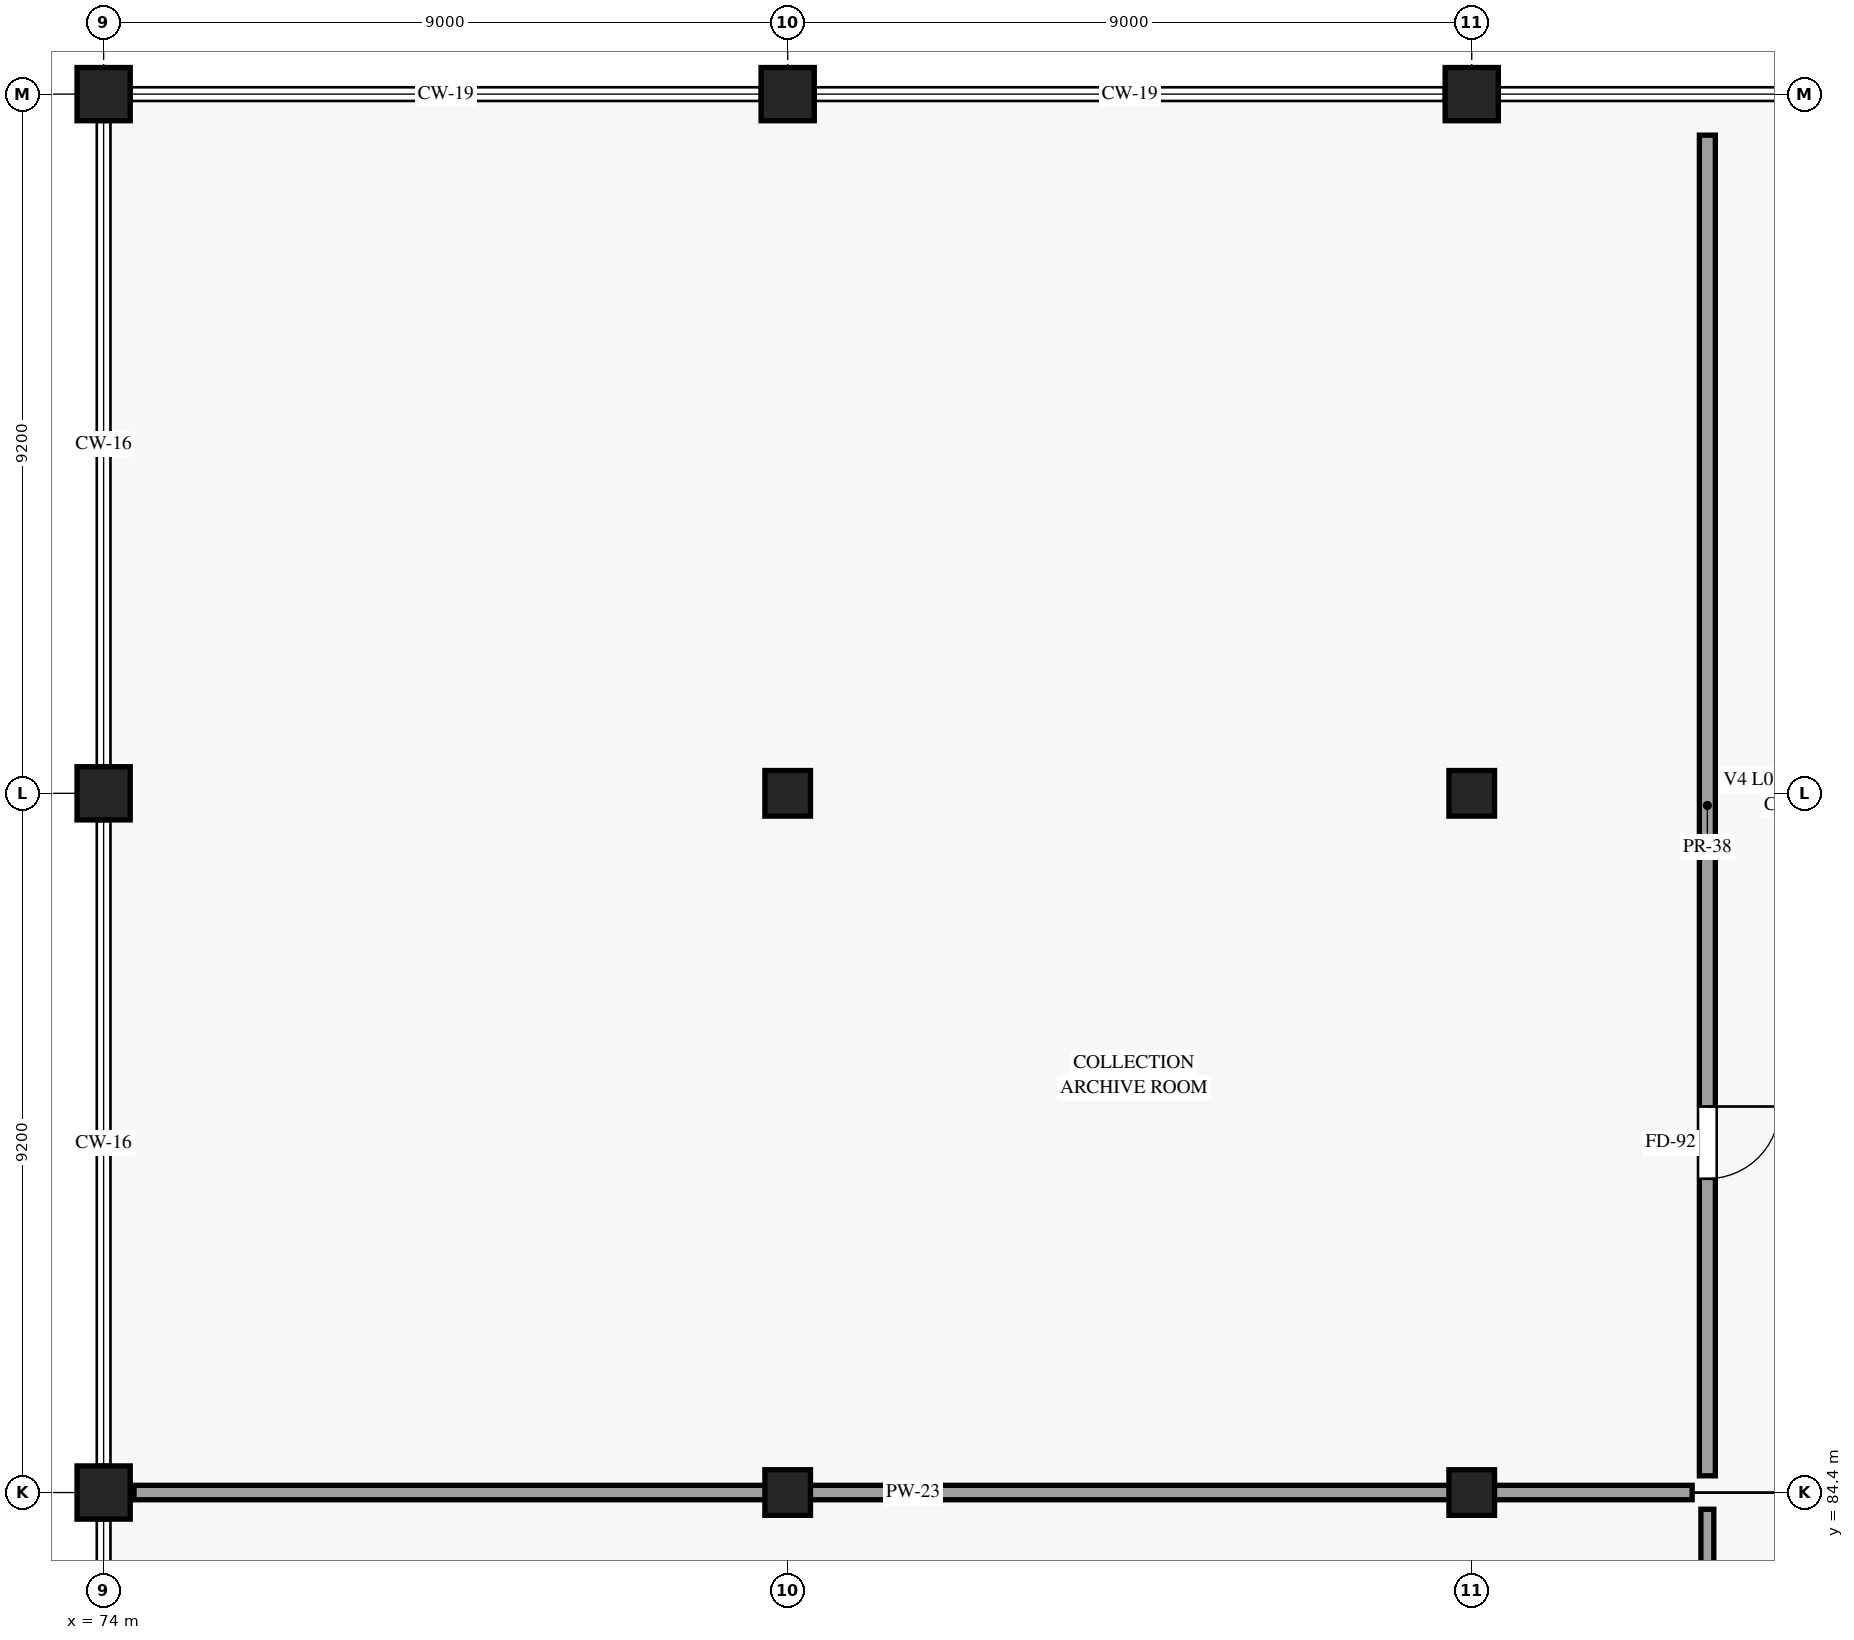
"""IFC4 building model, lengths in metres.
Left out: names, types, materials, properties, quantities, classifications, styles, units other than length and angle.
Written with IfcOpenShell. Run it as: python <this file> out.ifc"""

import sys

from ifc_helpers import new_model, si_unit, direction, frame, frame_2d, origin, origin_2d, place, context, subcontext, project, spatial, rectangle, extrude, element, fill, save


model = new_model("IFC4")
c1 = context("Model", 3, precision=1e-05, world=origin(), true_north=direction((0.0, 1.0)))
c2 = subcontext(c1, "Body", "Model", "MODEL_VIEW")
j1 = project(units=[si_unit("LENGTHUNIT", "METRE"), si_unit("PLANEANGLEUNIT", "RADIAN")], contexts=[c1])
p1 = place(None, origin())
s1 = spatial("IfcSite", under=j1, at=p1, CompositionType="ELEMENT")
p2 = place(p1, origin())
s2 = spatial("IfcBuilding", under=s1, at=p2, CompositionType="ELEMENT")
p3 = place(p2, frame((0.0, 0.0, 5.4)))
s3 = spatial("IfcBuildingStorey", under=s2, at=p3, CompositionType="ELEMENT", Elevation=5.4)
for number, where, z_axis, x_axis in (
    (1, (74.0, 84.4, 0.0), (0.0, 0.0, 1.0), (1.0, 0.0, 0.0)),
    (2, (74.0, 93.6, 0.0), (0.0, 0.0, 1.0), (1.0, 0.0, 0.0)),
    (3, (74.0, 102.8, 0.0), (0.0, 0.0, 1.0), (1.0, 0.0, 0.0)),
):
    element("IfcColumn", number, at=place(p3, frame(where, z_axis=z_axis, x_axis=x_axis)), inside=s3, PredefinedType="COLUMN", context=c2, shape_type="SweptSolid", body=[
        extrude(rectangle(XDim=0.7, YDim=0.7, at=origin_2d()), origin(), (0.0, 0.0, 1.0), 4.8),
    ])
for number, where, z_axis, x_axis in (
    (4, (83.0, 84.4, 0.0), (0.0, 0.0, 1.0), (1.0, 0.0, 0.0)),
    (5, (83.0, 93.6, 0.0), (0.0, 0.0, 1.0), (1.0, 0.0, 0.0)),
):
    element("IfcColumn", number, at=place(p3, frame(where, z_axis=z_axis, x_axis=x_axis)), inside=s3, PredefinedType="COLUMN", context=c2, shape_type="SweptSolid", body=[
        extrude(rectangle(XDim=0.6, YDim=0.6, at=origin_2d()), origin(), (0.0, 0.0, 1.0), 4.8),
    ])
p4 = place(p3, frame((83.0, 102.8, 0.0), z_axis=(0.0, 0.0, 1.0), x_axis=(1.0, 0.0, 0.0)))
e6 = element("IfcColumn", 6, at=p4, inside=s3, PredefinedType="COLUMN", context=c2, shape_type="SweptSolid", body=[
    extrude(rectangle(XDim=0.7, YDim=0.7, at=origin_2d()), origin(), (0.0, 0.0, 1.0), 4.8),
])
for number, where, z_axis, x_axis in (
    (7, (92.0, 84.4, 0.0), (0.0, 0.0, 1.0), (1.0, 0.0, 0.0)),
    (8, (92.0, 93.6, 0.0), (0.0, 0.0, 1.0), (1.0, 0.0, 0.0)),
):
    element("IfcColumn", number, at=place(p3, frame(where, z_axis=z_axis, x_axis=x_axis)), inside=s3, PredefinedType="COLUMN", context=c2, shape_type="SweptSolid", body=[
        extrude(rectangle(XDim=0.6, YDim=0.6, at=origin_2d()), origin(), (0.0, 0.0, 1.0), 4.8),
    ])
p5 = place(p3, frame((92.0, 102.8, 0.0), z_axis=(0.0, 0.0, 1.0), x_axis=(1.0, 0.0, 0.0)))
e9 = element("IfcColumn", 9, at=p5, inside=s3, PredefinedType="COLUMN", context=c2, shape_type="SweptSolid", body=[
    extrude(rectangle(XDim=0.7, YDim=0.7, at=origin_2d()), origin(), (0.0, 0.0, 1.0), 4.8),
])
p6 = place(p3, frame((95.1, 75.42, 0.0), z_axis=(0.0, 0.0, 1.0), x_axis=(0.0, 1.0, 0.0)))
e10 = element("IfcWall", 10, at=p6, inside=s3, PredefinedType="PARTITIONING", context=c2, shape_type="SweptSolid", body=[
    extrude(rectangle(XDim=8.76, YDim=0.17, at=frame_2d((4.38, 0.0))), origin(), (0.0, 0.0, 1.0), 3.675),
])
p7 = place(p6, frame((5.12, 0.0, 0.0), z_axis=(0.0, 0.0, 1.0), x_axis=(-1.0, 0.0, 0.0)))
e11 = element("IfcOpeningElement", 11, at=p7, cuts=e10, PredefinedType="OPENING", context=c2, shape_type="SweptSolid", body=[
    extrude(rectangle(XDim=1.24, YDim=2.32, at=frame_2d((0.62, 1.16))), frame((0.0, 0.095, 0.0), z_axis=(0.0, -1.0, 0.0), x_axis=(1.0, 0.0, 0.0)), (0.0, 0.0, 1.0), 0.19),
])
p8 = place(p3, frame((74.4, 84.4, 0.0), z_axis=(0.0, 0.0, 1.0), x_axis=(1.0, 0.0, 0.0)))
e12 = element("IfcWall", 12, at=p8, inside=s3, PredefinedType="PARTITIONING", context=c2, shape_type="SweptSolid", body=[
    extrude(rectangle(XDim=20.5, YDim=0.19, at=frame_2d((10.25, 0.0))), origin(), (0.0, 0.0, 1.0), 3.675),
])
p9 = place(p3, frame((95.1, 84.62, 0.0), z_axis=(0.0, 0.0, 1.0), x_axis=(0.0, 1.0, 0.0)))
e13 = element("IfcWall", 13, at=p9, inside=s3, PredefinedType="PARTITIONING", context=c2, shape_type="SweptSolid", body=[
    extrude(rectangle(XDim=17.64, YDim=0.21, at=frame_2d((8.82, 0.0))), origin(), (0.0, 0.0, 1.0), 3.675),
])
p10 = place(p9, frame((4.859, 0.0, 0.0), z_axis=(0.0, 0.0, 1.0), x_axis=(-1.0, 0.0, 0.0)))
e14 = element("IfcOpeningElement", 14, at=p10, cuts=e13, PredefinedType="OPENING", context=c2, shape_type="SweptSolid", body=[
    extrude(rectangle(XDim=0.95, YDim=2.15, at=frame_2d((0.475, 1.075))), frame((0.0, 0.115, 0.0), z_axis=(0.0, -1.0, 0.0), x_axis=(1.0, 0.0, 0.0)), (0.0, 0.0, 1.0), 0.23),
])
p11 = place(p10, origin())
e15 = element("IfcDoor", 15, at=p11, inside=s3, OperationType="SINGLE_SWING_LEFT", PredefinedType="DOOR", context=c2, shape_type="SweptSolid", body=[
    extrude(rectangle(XDim=0.95, YDim=2.15, at=frame_2d((0.475, 1.075))), frame((0.0, 0.025, 0.0), z_axis=(0.0, -1.0, 0.0), x_axis=(1.0, 0.0, 0.0)), (0.0, 0.0, 1.0), 0.05),
])
fill(e14, e15)
save(model, sys.argv[1])
